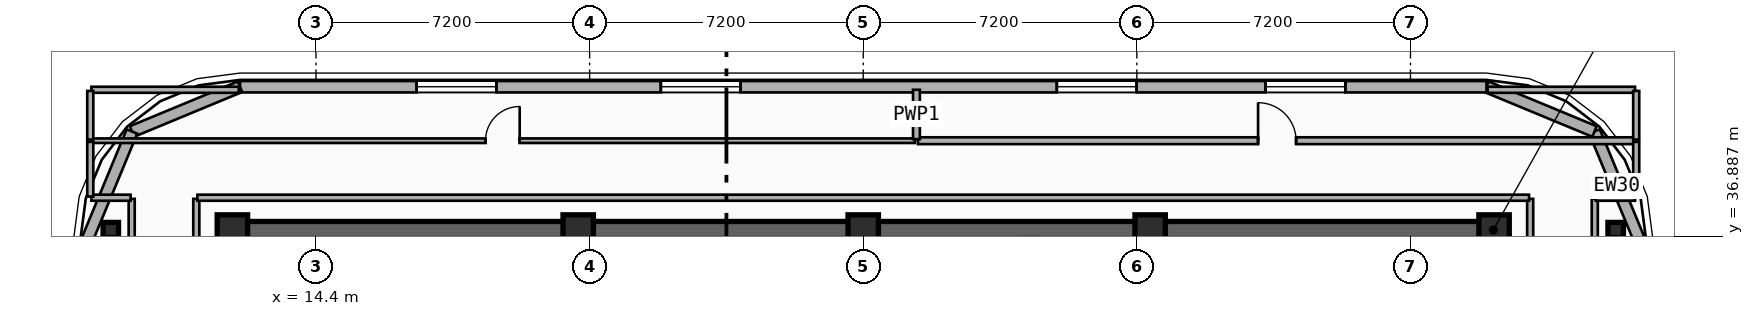
"""IFC4 building model, lengths in metres.
Left out: names, types, materials, properties, quantities, classifications, styles, units other than length and angle.
Written with IfcOpenShell. Run it as: python <this file> out.ifc"""

import sys

from ifc_helpers import new_model, si_unit, direction, frame, frame_2d, origin, origin_2d, place, context, subcontext, project, spatial, rectangle, i_section, extrude, element, fill, save


model = new_model("IFC4")
c1 = context("Model", 3, precision=1e-05, world=origin(), true_north=direction((0.0, 1.0)))
c2 = subcontext(c1, "Body", "Model", "MODEL_VIEW")
j1 = project(units=[si_unit("LENGTHUNIT", "METRE"), si_unit("PLANEANGLEUNIT", "RADIAN")], contexts=[c1])
p1 = place(None, origin())
s1 = spatial("IfcSite", under=j1, at=p1, CompositionType="ELEMENT")
p2 = place(p1, origin())
s2 = spatial("IfcBuilding", under=s1, at=p2, CompositionType="ELEMENT")
p3 = place(p2, frame((0.0, 0.0, 258.4)))
s3 = spatial("IfcBuildingStorey", under=s2, at=p3, CompositionType="ELEMENT", Elevation=258.4)
p4 = place(p3, frame((12.15, 37.05, 0.0), z_axis=(0.0, 0.0, 1.0), x_axis=(1.0, 0.0, 0.0)))
e1 = element("IfcWall", 1, at=p4, inside=s3, PredefinedType="SHEAR", context=c2, shape_type="SweptSolid", body=[
    extrude(rectangle(XDim=33.23, YDim=0.45, at=frame_2d((16.615, 0.0))), origin(), (0.0, 0.0, 1.0), 3.7),
])
for number, where, z_axis, x_axis in (
    (2, (12.2, 37.05, 0.0), (0.0, 0.0, 1.0), (1.0, 0.0, 0.0)),
    (3, (21.3, 37.05, 0.0), (0.0, 0.0, 1.0), (1.0, 0.0, 0.0)),
    (4, (28.8, 37.05, 0.0), (0.0, 0.0, 1.0), (1.0, 0.0, 0.0)),
    (5, (36.35, 37.05, 0.0), (0.0, 0.0, 1.0), (1.0, 0.0, 0.0)),
    (6, (45.4, 37.05, 0.0), (0.0, 0.0, 1.0), (1.0, 0.0, 0.0)),
):
    element("IfcColumn", number, at=place(p3, frame(where, z_axis=z_axis, x_axis=x_axis)), inside=s3, PredefinedType="COLUMN", context=c2, shape_type="SweptSolid", body=[
        extrude(rectangle(XDim=0.8, YDim=0.8, at=origin_2d()), origin(), (0.0, 0.0, 1.0), 3.7),
    ])
for number, where, z_axis, x_axis in (
    (7, (9.0, 37.05, 0.0), (0.0, 0.0, 1.0), (1.0, 0.0, 0.0)),
    (8, (48.6, 37.05, 0.0), (0.0, 0.0, 1.0), (1.0, 0.0, 0.0)),
):
    element("IfcColumn", number, at=place(p3, frame(where, z_axis=z_axis, x_axis=x_axis)), inside=s3, PredefinedType="COLUMN", context=c2, shape_type="SweptSolid", body=[
        extrude(i_section(OverallWidth=0.408, OverallDepth=0.4, WebThickness=0.025, FlangeThickness=0.039, FilletRadius=0.015, at=origin_2d()), origin(), (0.0, 0.0, 1.0), 3.7),
    ])
for number, where, z_axis, x_axis in (
    (9, (48.042, 39.643, 0.0), (0.0, 0.0, 1.0), (0.383, -0.924, 0.0)),
    (10, (45.2, 40.82, 0.0), (0.0, 0.0, 1.0), (0.924, -0.383, 0.0)),
):
    element("IfcWall", number, at=place(p3, frame(where, z_axis=z_axis, x_axis=x_axis)), inside=s3, PredefinedType="SOLIDWALL", context=c2, shape_type="SweptSolid", body=[
        extrude(rectangle(XDim=3.077, YDim=0.3, at=frame_2d((1.538, 0.0))), origin(), (0.0, 0.0, 1.0), 3.42),
    ])
p5 = place(p3, frame((12.4, 40.82, 0.0), z_axis=(0.0, 0.0, 1.0), x_axis=(1.0, 0.0, 0.0)))
e11 = element("IfcWall", 11, at=p5, inside=s3, PredefinedType="SOLIDWALL", context=c2, shape_type="SweptSolid", body=[
    extrude(rectangle(XDim=32.8, YDim=0.3, at=frame_2d((16.4, 0.0))), origin(), (0.0, 0.0, 1.0), 3.42),
])
p6 = place(p5, frame((4.647, 0.0, 0.75)))
e12 = element("IfcOpeningElement", 12, at=p6, cuts=e11, PredefinedType="OPENING", context=c2, shape_type="SweptSolid", body=[
    extrude(rectangle(XDim=2.1, YDim=2.1, at=frame_2d((1.05, 1.05))), frame((0.0, 0.16, 0.0), z_axis=(0.0, -1.0, 0.0), x_axis=(1.0, 0.0, 0.0)), (0.0, 0.0, 1.0), 0.32),
])
p7 = place(p5, frame((11.073, 0.0, 0.75)))
e13 = element("IfcOpeningElement", 13, at=p7, cuts=e11, PredefinedType="OPENING", context=c2, shape_type="SweptSolid", body=[
    extrude(rectangle(XDim=2.1, YDim=2.1, at=frame_2d((1.05, 1.05))), frame((0.0, 0.16, 0.0), z_axis=(0.0, -1.0, 0.0), x_axis=(1.0, 0.0, 0.0)), (0.0, 0.0, 1.0), 0.32),
])
p8 = place(p5, frame((21.493, 0.0, 0.75)))
e14 = element("IfcOpeningElement", 14, at=p8, cuts=e11, PredefinedType="OPENING", context=c2, shape_type="SweptSolid", body=[
    extrude(rectangle(XDim=2.1, YDim=2.1, at=frame_2d((1.05, 1.05))), frame((0.0, 0.16, 0.0), z_axis=(0.0, -1.0, 0.0), x_axis=(1.0, 0.0, 0.0)), (0.0, 0.0, 1.0), 0.32),
])
p9 = place(p5, frame((26.987, 0.0, 0.75)))
e15 = element("IfcOpeningElement", 15, at=p9, cuts=e11, PredefinedType="OPENING", context=c2, shape_type="SweptSolid", body=[
    extrude(rectangle(XDim=2.1, YDim=2.1, at=frame_2d((1.05, 1.05))), frame((0.0, 0.16, 0.0), z_axis=(0.0, -1.0, 0.0), x_axis=(1.0, 0.0, 0.0)), (0.0, 0.0, 1.0), 0.32),
])
for number, where, z_axis, x_axis in (
    (16, (9.557, 39.643, 0.0), (0.0, 0.0, 1.0), (0.924, 0.383, 0.0)),
    (17, (8.38, 36.8, 0.0), (0.0, 0.0, 1.0), (0.383, 0.924, 0.0)),
):
    element("IfcWall", number, at=place(p3, frame(where, z_axis=z_axis, x_axis=x_axis)), inside=s3, PredefinedType="SOLIDWALL", context=c2, shape_type="SweptSolid", body=[
        extrude(rectangle(XDim=3.077, YDim=0.3, at=frame_2d((1.538, 0.0))), origin(), (0.0, 0.0, 1.0), 3.42),
    ])
p10 = place(p3, frame((8.46, 39.4, 0.0), z_axis=(0.0, 0.0, 1.0), x_axis=(1.0, 0.0, 0.0)))
e18 = element("IfcWall", 18, at=p10, inside=s3, PredefinedType="PARTITIONING", context=c2, shape_type="SweptSolid", body=[
    extrude(rectangle(XDim=21.7, YDim=0.12, at=frame_2d((10.85, 0.0))), origin(), (0.0, 0.0, 1.0), 3.42),
])
p11 = place(p10, frame((10.4, 0.0, 0.0)))
e19 = element("IfcOpeningElement", 19, at=p11, cuts=e18, PredefinedType="OPENING", context=c2, shape_type="SweptSolid", body=[
    extrude(rectangle(XDim=0.9, YDim=2.1, at=frame_2d((0.45, 1.05))), frame((0.0, 0.07, 0.0), z_axis=(0.0, -1.0, 0.0), x_axis=(1.0, 0.0, 0.0)), (0.0, 0.0, 1.0), 0.14),
])
p12 = place(p3, frame((30.24, 39.4, 0.0), z_axis=(0.0, 0.0, 1.0), x_axis=(1.0, 0.0, 0.0)))
e20 = element("IfcWall", 20, at=p12, inside=s3, PredefinedType="PLUMBINGWALL", context=c2, shape_type="SweptSolid", body=[
    extrude(rectangle(XDim=18.9, YDim=0.18, at=frame_2d((9.45, 0.0))), origin(), (0.0, 0.0, 1.0), 3.42),
])
p13 = place(p12, frame((8.95, 0.0, 0.0)))
e21 = element("IfcOpeningElement", 21, at=p13, cuts=e20, PredefinedType="OPENING", context=c2, shape_type="SweptSolid", body=[
    extrude(rectangle(XDim=1.0, YDim=2.15, at=frame_2d((0.5, 1.075))), frame((0.0, 0.1, 0.0), z_axis=(0.0, -1.0, 0.0), x_axis=(1.0, 0.0, 0.0)), (0.0, 0.0, 1.0), 0.2),
])
p14 = place(p3, frame((30.2, 39.44, 0.0), z_axis=(0.0, 0.0, 1.0), x_axis=(0.0, 1.0, 0.0)))
e22 = element("IfcWall", 22, at=p14, inside=s3, PredefinedType="PLUMBINGWALL", context=c2, shape_type="SweptSolid", body=[
    extrude(rectangle(XDim=1.3, YDim=0.18, at=frame_2d((0.65, 0.0))), origin(), (0.0, 0.0, 1.0), 3.42),
])
for number, where, z_axis, x_axis in (
    (23, (9.55, 27.63, 0.0), (0.0, 0.0, 1.0), (0.0, 1.0, 0.0)),
    (24, (11.25, 27.63, 0.0), (0.0, 0.0, 1.0), (0.0, 1.0, 0.0)),
    (25, (46.35, 27.63, 0.0), (0.0, 0.0, 1.0), (0.0, 1.0, 0.0)),
    (26, (48.05, 27.63, 0.0), (0.0, 0.0, 1.0), (0.0, 1.0, 0.0)),
):
    element("IfcWall", number, at=place(p3, frame(where, z_axis=z_axis, x_axis=x_axis)), inside=s3, PredefinedType="PARTITIONING", context=c2, shape_type="SweptSolid", body=[
        extrude(rectangle(XDim=10.24, YDim=0.16, at=frame_2d((5.12, 0.0))), origin(), (0.0, 0.0, 1.0), 2.9),
    ])
p15 = place(p3, frame((8.49, 37.9, 0.0), z_axis=(0.0, 0.0, 1.0), x_axis=(1.0, 0.0, 0.0)))
e27 = element("IfcWall", 27, at=p15, inside=s3, PredefinedType="PARTITIONING", context=c2, shape_type="SweptSolid", body=[
    extrude(rectangle(XDim=1.03, YDim=0.16, at=frame_2d((0.515, 0.0))), origin(), (0.0, 0.0, 1.0), 3.42),
])
p16 = place(p3, frame((11.28, 37.9, 0.0), z_axis=(0.0, 0.0, 1.0), x_axis=(1.0, 0.0, 0.0)))
e28 = element("IfcWall", 28, at=p16, inside=s3, PredefinedType="PARTITIONING", context=c2, shape_type="SweptSolid", body=[
    extrude(rectangle(XDim=35.04, YDim=0.16, at=frame_2d((17.52, 0.0))), origin(), (0.0, 0.0, 1.0), 3.42),
])
p17 = place(p3, frame((48.08, 37.9, 0.0), z_axis=(0.0, 0.0, 1.0), x_axis=(1.0, 0.0, 0.0)))
e29 = element("IfcWall", 29, at=p17, inside=s3, PredefinedType="PARTITIONING", context=c2, shape_type="SweptSolid", body=[
    extrude(rectangle(XDim=1.03, YDim=0.16, at=frame_2d((0.515, 0.0))), origin(), (0.0, 0.0, 1.0), 3.42),
])
for number, where, z_axis, x_axis in (
    (30, (8.46, 37.93, 0.0), (0.0, 0.0, 1.0), (0.0, 1.0, 0.0)),
    (31, (49.14, 37.93, 0.0), (0.0, 0.0, 1.0), (0.0, 1.0, 0.0)),
):
    element("IfcWall", number, at=place(p3, frame(where, z_axis=z_axis, x_axis=x_axis)), inside=s3, PredefinedType="PARTITIONING", context=c2, shape_type="SweptSolid", body=[
        extrude(rectangle(XDim=1.44, YDim=0.16, at=frame_2d((0.72, 0.0))), origin(), (0.0, 0.0, 1.0), 3.42),
    ])
p18 = place(p3, frame((8.49, 40.74, 0.0), z_axis=(0.0, 0.0, 1.0), x_axis=(1.0, 0.0, 0.0)))
e32 = element("IfcWall", 32, at=p18, inside=s3, PredefinedType="PARTITIONING", context=c2, shape_type="SweptSolid", body=[
    extrude(rectangle(XDim=3.88, YDim=0.16, at=frame_2d((1.94, 0.0))), origin(), (0.0, 0.0, 1.0), 3.42),
])
p19 = place(p3, frame((8.46, 39.43, 0.0), z_axis=(0.0, 0.0, 1.0), x_axis=(0.0, 1.0, 0.0)))
e33 = element("IfcWall", 33, at=p19, inside=s3, PredefinedType="PARTITIONING", context=c2, shape_type="SweptSolid", body=[
    extrude(rectangle(XDim=1.28, YDim=0.16, at=frame_2d((0.64, 0.0))), origin(), (0.0, 0.0, 1.0), 3.42),
])
p20 = place(p3, frame((45.23, 40.74, 0.0), z_axis=(0.0, 0.0, 1.0), x_axis=(1.0, 0.0, 0.0)))
e34 = element("IfcWall", 34, at=p20, inside=s3, PredefinedType="PARTITIONING", context=c2, shape_type="SweptSolid", body=[
    extrude(rectangle(XDim=3.88, YDim=0.16, at=frame_2d((1.94, 0.0))), origin(), (0.0, 0.0, 1.0), 3.42),
])
p21 = place(p3, frame((49.14, 39.43, 0.0), z_axis=(0.0, 0.0, 1.0), x_axis=(0.0, 1.0, 0.0)))
e35 = element("IfcWall", 35, at=p21, inside=s3, PredefinedType="PARTITIONING", context=c2, shape_type="SweptSolid", body=[
    extrude(rectangle(XDim=1.28, YDim=0.16, at=frame_2d((0.64, 0.0))), origin(), (0.0, 0.0, 1.0), 3.42),
])
p22 = place(p6, origin())
e36 = element("IfcWindow", 36, at=p22, inside=s3, PartitioningType="SINGLE_PANEL", PredefinedType="WINDOW", context=c2, shape_type="SweptSolid", body=[
    extrude(rectangle(XDim=2.1, YDim=2.1, at=frame_2d((1.05, 1.05))), frame((0.0, 0.03, 0.0), z_axis=(0.0, -1.0, 0.0), x_axis=(1.0, 0.0, 0.0)), (0.0, 0.0, 1.0), 0.06),
])
fill(e12, e36)
p23 = place(p7, origin())
e37 = element("IfcWindow", 37, at=p23, inside=s3, PartitioningType="SINGLE_PANEL", PredefinedType="WINDOW", context=c2, shape_type="SweptSolid", body=[
    extrude(rectangle(XDim=2.1, YDim=2.1, at=frame_2d((1.05, 1.05))), frame((0.0, 0.03, 0.0), z_axis=(0.0, -1.0, 0.0), x_axis=(1.0, 0.0, 0.0)), (0.0, 0.0, 1.0), 0.06),
])
fill(e13, e37)
p24 = place(p8, origin())
e38 = element("IfcWindow", 38, at=p24, inside=s3, PartitioningType="SINGLE_PANEL", PredefinedType="WINDOW", context=c2, shape_type="SweptSolid", body=[
    extrude(rectangle(XDim=2.1, YDim=2.1, at=frame_2d((1.05, 1.05))), frame((0.0, 0.03, 0.0), z_axis=(0.0, -1.0, 0.0), x_axis=(1.0, 0.0, 0.0)), (0.0, 0.0, 1.0), 0.06),
])
fill(e14, e38)
p25 = place(p9, origin())
e39 = element("IfcWindow", 39, at=p25, inside=s3, PartitioningType="SINGLE_PANEL", PredefinedType="WINDOW", context=c2, shape_type="SweptSolid", body=[
    extrude(rectangle(XDim=2.1, YDim=2.1, at=frame_2d((1.05, 1.05))), frame((0.0, 0.03, 0.0), z_axis=(0.0, -1.0, 0.0), x_axis=(1.0, 0.0, 0.0)), (0.0, 0.0, 1.0), 0.06),
])
fill(e15, e39)
p26 = place(p11, origin())
e40 = element("IfcDoor", 40, at=p26, inside=s3, OperationType="SINGLE_SWING_RIGHT", PredefinedType="DOOR", context=c2, shape_type="SweptSolid", body=[
    extrude(rectangle(XDim=0.9, YDim=2.1, at=frame_2d((0.45, 1.05))), frame((0.0, 0.025, 0.0), z_axis=(0.0, -1.0, 0.0), x_axis=(1.0, 0.0, 0.0)), (0.0, 0.0, 1.0), 0.05),
])
fill(e19, e40)
p27 = place(p13, origin())
e41 = element("IfcDoor", 41, at=p27, inside=s3, OperationType="SINGLE_SWING_LEFT", PredefinedType="DOOR", context=c2, shape_type="SweptSolid", body=[
    extrude(rectangle(XDim=1.0, YDim=2.15, at=frame_2d((0.5, 1.075))), frame((0.0, 0.025, 0.0), z_axis=(0.0, -1.0, 0.0), x_axis=(1.0, 0.0, 0.0)), (0.0, 0.0, 1.0), 0.05),
])
fill(e21, e41)
save(model, sys.argv[1])
